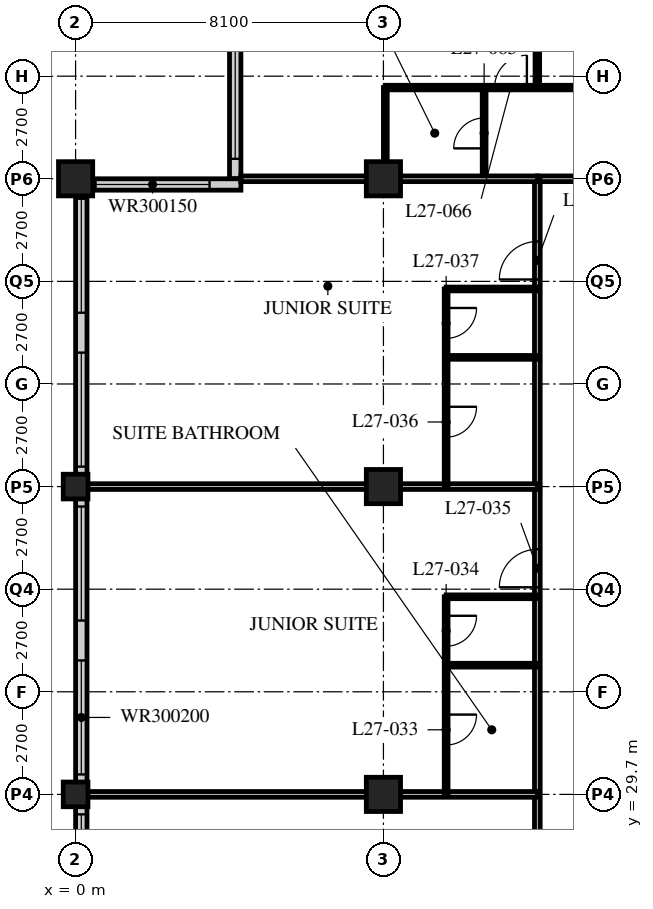
"""IFC4 building model, lengths in metres.
Left out: names, types, materials, properties, quantities, classifications, styles, units other than length and angle.
Written with IfcOpenShell. Run it as: python <this file> out.ifc"""

import sys

from ifc_helpers import new_model, si_unit, direction, frame, frame_2d, origin, origin_2d, place, context, subcontext, project, spatial, rectangle, hollow_rectangle, extrude, element, fill, save


model = new_model("IFC4")
c1 = context("Model", 3, precision=1e-05, world=origin(), true_north=direction((0.0, 1.0)))
c2 = subcontext(c1, "Body", "Model", "MODEL_VIEW")
j1 = project(units=[si_unit("LENGTHUNIT", "METRE"), si_unit("PLANEANGLEUNIT", "RADIAN")], contexts=[c1])
p1 = place(None, origin())
s1 = spatial("IfcSite", under=j1, at=p1, CompositionType="ELEMENT")
p2 = place(p1, origin())
s2 = spatial("IfcBuilding", under=s1, at=p2, CompositionType="ELEMENT")
p3 = place(p2, frame((0.0, 0.0, 110.2)))
s3 = spatial("IfcBuildingStorey", under=s2, at=p3, CompositionType="ELEMENT", Elevation=110.2)
for number, where, z_axis, x_axis in (
    (1, (0.0, 29.7, 0.0), (0.0, 0.0, 1.0), (1.0, 0.0, 0.0)),
    (2, (0.0, 37.8, 0.0), (0.0, 0.0, 1.0), (1.0, 0.0, 0.0)),
):
    element("IfcColumn", number, at=place(p3, frame(where, z_axis=z_axis, x_axis=x_axis)), inside=s3, PredefinedType="COLUMN", context=c2, shape_type="SweptSolid", body=[
        extrude(hollow_rectangle(XDim=0.65, YDim=0.65, WallThickness=0.055, at=origin_2d()), origin(), (0.0, 0.0, 1.0), 3.4),
    ])
for number, where, z_axis, x_axis in (
    (3, (0.0, 45.9, 0.0), (0.0, 0.0, 1.0), (1.0, 0.0, 0.0)),
    (4, (8.1, 29.7, 0.0), (0.0, 0.0, 1.0), (1.0, 0.0, 0.0)),
    (5, (8.1, 37.8, 0.0), (0.0, 0.0, 1.0), (1.0, 0.0, 0.0)),
    (6, (8.1, 45.9, 0.0), (0.0, 0.0, 1.0), (1.0, 0.0, 0.0)),
):
    element("IfcColumn", number, at=place(p3, frame(where, z_axis=z_axis, x_axis=x_axis)), inside=s3, PredefinedType="COLUMN", context=c2, shape_type="SweptSolid", body=[
        extrude(hollow_rectangle(XDim=0.9, YDim=0.9, WallThickness=0.09, at=origin_2d()), origin(), (0.0, 0.0, 1.0), 3.4),
    ])
p4 = place(p3, frame((4.2, 49.65, 0.0), z_axis=(0.0, 0.0, 1.0), x_axis=(0.0, -1.0, 0.0)))
e7 = element("IfcWall", 7, at=p4, inside=s3, PredefinedType="SOLIDWALL", context=c2, shape_type="SweptSolid", body=[
    extrude(rectangle(XDim=3.75, YDim=0.3, at=frame_2d((1.875, 0.0))), origin(), (0.0, 0.0, 1.0), 3.19),
])
p5 = place(p4, frame((0.225, 0.0, 0.9)))
e8 = element("IfcOpeningElement", 8, at=p5, cuts=e7, PredefinedType="OPENING", context=c2, shape_type="SweptSolid", body=[
    extrude(rectangle(XDim=3.0, YDim=1.5, at=frame_2d((1.5, 0.75))), frame((0.0, 0.16, 0.0), z_axis=(0.0, -1.0, 0.0), x_axis=(1.0, 0.0, 0.0)), (0.0, 0.0, 1.0), 0.32),
])
p6 = place(p3, frame((4.35, 45.75, 0.0), z_axis=(0.0, 0.0, 1.0), x_axis=(-1.0, 0.0, 0.0)))
e9 = element("IfcWall", 9, at=p6, inside=s3, PredefinedType="SOLIDWALL", context=c2, shape_type="SweptSolid", body=[
    extrude(rectangle(XDim=4.35, YDim=0.3, at=frame_2d((2.175, 0.0))), origin(), (0.0, 0.0, 1.0), 3.19),
])
p7 = place(p6, frame((0.825, 0.0, 0.9)))
e10 = element("IfcOpeningElement", 10, at=p7, cuts=e9, PredefinedType="OPENING", context=c2, shape_type="SweptSolid", body=[
    extrude(rectangle(XDim=3.0, YDim=1.5, at=frame_2d((1.5, 0.75))), frame((0.0, 0.16, 0.0), z_axis=(0.0, -1.0, 0.0), x_axis=(1.0, 0.0, 0.0)), (0.0, 0.0, 1.0), 0.32),
])
p8 = place(p3, frame((0.15, 45.6, 0.0), z_axis=(0.0, 0.0, 1.0), x_axis=(0.0, -1.0, 0.0)))
e11 = element("IfcWall", 11, at=p8, inside=s3, PredefinedType="SOLIDWALL", context=c2, shape_type="SweptSolid", body=[
    extrude(rectangle(XDim=32.1, YDim=0.3, at=frame_2d((16.05, 0.0))), origin(), (0.0, 0.0, 1.0), 3.19),
])
p9 = place(p8, frame((0.225, 0.0, 0.9)))
e12 = element("IfcOpeningElement", 12, at=p9, cuts=e11, PredefinedType="OPENING", context=c2, shape_type="SweptSolid", body=[
    extrude(rectangle(XDim=3.0, YDim=2.0, at=frame_2d((1.5, 1.0))), frame((0.0, 0.16, 0.0), z_axis=(0.0, -1.0, 0.0), x_axis=(1.0, 0.0, 0.0)), (0.0, 0.0, 1.0), 0.32),
])
p10 = place(p8, frame((4.275, 0.0, 0.9)))
e13 = element("IfcOpeningElement", 13, at=p10, cuts=e11, PredefinedType="OPENING", context=c2, shape_type="SweptSolid", body=[
    extrude(rectangle(XDim=3.0, YDim=2.0, at=frame_2d((1.5, 1.0))), frame((0.0, 0.16, 0.0), z_axis=(0.0, -1.0, 0.0), x_axis=(1.0, 0.0, 0.0)), (0.0, 0.0, 1.0), 0.32),
])
p11 = place(p8, frame((8.325, 0.0, 0.9)))
e14 = element("IfcOpeningElement", 14, at=p11, cuts=e11, PredefinedType="OPENING", context=c2, shape_type="SweptSolid", body=[
    extrude(rectangle(XDim=3.0, YDim=2.0, at=frame_2d((1.5, 1.0))), frame((0.0, 0.16, 0.0), z_axis=(0.0, -1.0, 0.0), x_axis=(1.0, 0.0, 0.0)), (0.0, 0.0, 1.0), 0.32),
])
p12 = place(p8, frame((12.375, 0.0, 0.9)))
e15 = element("IfcOpeningElement", 15, at=p12, cuts=e11, PredefinedType="OPENING", context=c2, shape_type="SweptSolid", body=[
    extrude(rectangle(XDim=3.0, YDim=2.0, at=frame_2d((1.5, 1.0))), frame((0.0, 0.16, 0.0), z_axis=(0.0, -1.0, 0.0), x_axis=(1.0, 0.0, 0.0)), (0.0, 0.0, 1.0), 0.32),
])
p13 = place(p8, frame((16.425, 0.0, 0.9)))
e16 = element("IfcOpeningElement", 16, at=p13, cuts=e11, PredefinedType="OPENING", context=c2, shape_type="SweptSolid", body=[
    extrude(rectangle(XDim=3.0, YDim=2.0, at=frame_2d((1.5, 1.0))), frame((0.0, 0.16, 0.0), z_axis=(0.0, -1.0, 0.0), x_axis=(1.0, 0.0, 0.0)), (0.0, 0.0, 1.0), 0.32),
])
p14 = place(p8, frame((20.475, 0.0, 0.9)))
e17 = element("IfcOpeningElement", 17, at=p14, cuts=e11, PredefinedType="OPENING", context=c2, shape_type="SweptSolid", body=[
    extrude(rectangle(XDim=3.0, YDim=2.0, at=frame_2d((1.5, 1.0))), frame((0.0, 0.16, 0.0), z_axis=(0.0, -1.0, 0.0), x_axis=(1.0, 0.0, 0.0)), (0.0, 0.0, 1.0), 0.32),
])
p15 = place(p8, frame((24.525, 0.0, 0.9)))
e18 = element("IfcOpeningElement", 18, at=p15, cuts=e11, PredefinedType="OPENING", context=c2, shape_type="SweptSolid", body=[
    extrude(rectangle(XDim=3.0, YDim=2.0, at=frame_2d((1.5, 1.0))), frame((0.0, 0.16, 0.0), z_axis=(0.0, -1.0, 0.0), x_axis=(1.0, 0.0, 0.0)), (0.0, 0.0, 1.0), 0.32),
])
p16 = place(p8, frame((28.575, 0.0, 0.9)))
e19 = element("IfcOpeningElement", 19, at=p16, cuts=e11, PredefinedType="OPENING", context=c2, shape_type="SweptSolid", body=[
    extrude(rectangle(XDim=3.0, YDim=2.0, at=frame_2d((1.5, 1.0))), frame((0.0, 0.16, 0.0), z_axis=(0.0, -1.0, 0.0), x_axis=(1.0, 0.0, 0.0)), (0.0, 0.0, 1.0), 0.32),
])
p17 = place(p3, frame((12.15, 45.9, 0.0), z_axis=(0.0, 0.0, 1.0), x_axis=(1.0, 0.0, 0.0)))
e20 = element("IfcWall", 20, at=p17, inside=s3, PredefinedType="PARTITIONING", context=c2, shape_type="SweptSolid", body=[
    extrude(rectangle(XDim=32.4, YDim=0.15, at=frame_2d((16.2, 0.0))), origin(), (0.0, 0.0, 1.0), 2.578),
])
p18 = place(p17, frame((9.5, 0.0, 0.0)))
e21 = element("IfcOpeningElement", 21, at=p18, cuts=e20, PredefinedType="OPENING", context=c2, shape_type="SweptSolid", body=[
    extrude(rectangle(XDim=1.0, YDim=2.1, at=frame_2d((0.5, 1.05))), frame((0.0, 0.085, 0.0), z_axis=(0.0, -1.0, 0.0), x_axis=(1.0, 0.0, 0.0)), (0.0, 0.0, 1.0), 0.17),
])
p19 = place(p17, frame((17.6, 0.0, 0.0)))
e22 = element("IfcOpeningElement", 22, at=p19, cuts=e20, PredefinedType="OPENING", context=c2, shape_type="SweptSolid", body=[
    extrude(rectangle(XDim=1.0, YDim=2.1, at=frame_2d((0.5, 1.05))), frame((0.0, 0.085, 0.0), z_axis=(0.0, -1.0, 0.0), x_axis=(1.0, 0.0, 0.0)), (0.0, 0.0, 1.0), 0.17),
])
p20 = place(p17, frame((25.7, 0.0, 0.0)))
e23 = element("IfcOpeningElement", 23, at=p20, cuts=e20, PredefinedType="OPENING", context=c2, shape_type="SweptSolid", body=[
    extrude(rectangle(XDim=1.0, YDim=2.1, at=frame_2d((0.5, 1.05))), frame((0.0, 0.085, 0.0), z_axis=(0.0, -1.0, 0.0), x_axis=(1.0, 0.0, 0.0)), (0.0, 0.0, 1.0), 0.17),
])
p21 = place(p17, frame((29.875, 0.0, 0.0)))
e24 = element("IfcOpeningElement", 24, at=p21, cuts=e20, PredefinedType="OPENING", context=c2, shape_type="SweptSolid", body=[
    extrude(rectangle(XDim=1.0, YDim=2.1, at=frame_2d((0.5, 1.05))), frame((0.0, 0.085, 0.0), z_axis=(0.0, -1.0, 0.0), x_axis=(1.0, 0.0, 0.0)), (0.0, 0.0, 1.0), 0.17),
])
p22 = place(p17, frame((1.525, 0.0, 0.0)))
e25 = element("IfcOpeningElement", 25, at=p22, cuts=e20, PredefinedType="OPENING", context=c2, shape_type="SweptSolid", body=[
    extrude(rectangle(XDim=1.0, YDim=2.1, at=frame_2d((0.5, 1.05))), frame((0.0, 0.085, 0.0), z_axis=(0.0, -1.0, 0.0), x_axis=(1.0, 0.0, 0.0)), (0.0, 0.0, 1.0), 0.17),
])
p23 = place(p3, frame((12.15, 21.6, 0.0), z_axis=(0.0, 0.0, 1.0), x_axis=(0.0, 1.0, 0.0)))
e26 = element("IfcWall", 26, at=p23, inside=s3, PredefinedType="PARTITIONING", context=c2, shape_type="SweptSolid", body=[
    extrude(rectangle(XDim=24.3, YDim=0.15, at=frame_2d((12.15, 0.0))), origin(), (0.0, 0.0, 1.0), 3.19),
])
p24 = place(p23, frame((5.45, 0.0, 0.0)))
e27 = element("IfcOpeningElement", 27, at=p24, cuts=e26, PredefinedType="OPENING", context=c2, shape_type="SweptSolid", body=[
    extrude(rectangle(XDim=1.0, YDim=2.1, at=frame_2d((0.5, 1.05))), frame((0.0, 0.085, 0.0), z_axis=(0.0, -1.0, 0.0), x_axis=(1.0, 0.0, 0.0)), (0.0, 0.0, 1.0), 0.17),
])
p25 = place(p23, frame((13.55, 0.0, 0.0)))
e28 = element("IfcOpeningElement", 28, at=p25, cuts=e26, PredefinedType="OPENING", context=c2, shape_type="SweptSolid", body=[
    extrude(rectangle(XDim=1.0, YDim=2.1, at=frame_2d((0.5, 1.05))), frame((0.0, 0.085, 0.0), z_axis=(0.0, -1.0, 0.0), x_axis=(1.0, 0.0, 0.0)), (0.0, 0.0, 1.0), 0.17),
])
p26 = place(p23, frame((21.65, 0.0, 0.0)))
e29 = element("IfcOpeningElement", 29, at=p26, cuts=e26, PredefinedType="OPENING", context=c2, shape_type="SweptSolid", body=[
    extrude(rectangle(XDim=1.0, YDim=2.1, at=frame_2d((0.5, 1.05))), frame((0.0, 0.085, 0.0), z_axis=(0.0, -1.0, 0.0), x_axis=(1.0, 0.0, 0.0)), (0.0, 0.0, 1.0), 0.17),
])
p27 = place(p3, frame((12.15, 29.7, 0.0), z_axis=(0.0, 0.0, 1.0), x_axis=(-1.0, 0.0, 0.0)))
e30 = element("IfcWall", 30, at=p27, inside=s3, PredefinedType="PARTITIONING", context=c2, shape_type="SweptSolid", body=[
    extrude(rectangle(XDim=11.85, YDim=0.15, at=frame_2d((5.925, 0.0))), origin(), (0.0, 0.0, 1.0), 2.578),
])
p28 = place(p3, frame((9.75, 29.7, 0.0), z_axis=(0.0, 0.0, 1.0), x_axis=(0.0, 1.0, 0.0)))
e31 = element("IfcWall", 31, at=p28, inside=s3, PredefinedType="PARTITIONING", context=c2, shape_type="SweptSolid", body=[
    extrude(rectangle(XDim=5.2, YDim=0.1, at=frame_2d((2.6, 0.0))), origin(), (0.0, 0.0, 1.0), 3.19),
])
p29 = place(p28, frame((1.3, 0.0, 0.0)))
e32 = element("IfcOpeningElement", 32, at=p29, cuts=e31, PredefinedType="OPENING", context=c2, shape_type="SweptSolid", body=[
    extrude(rectangle(XDim=0.8, YDim=2.1, at=frame_2d((0.4, 1.05))), frame((0.0, 0.06, 0.0), z_axis=(0.0, -1.0, 0.0), x_axis=(1.0, 0.0, 0.0)), (0.0, 0.0, 1.0), 0.12),
])
p30 = place(p28, frame((3.9, 0.0, 0.0)))
e33 = element("IfcOpeningElement", 33, at=p30, cuts=e31, PredefinedType="OPENING", context=c2, shape_type="SweptSolid", body=[
    extrude(rectangle(XDim=0.8, YDim=2.1, at=frame_2d((0.4, 1.05))), frame((0.0, 0.06, 0.0), z_axis=(0.0, -1.0, 0.0), x_axis=(1.0, 0.0, 0.0)), (0.0, 0.0, 1.0), 0.12),
])
for number, where, z_axis, x_axis in (
    (34, (12.15, 33.1, 0.0), (0.0, 0.0, 1.0), (-1.0, 0.0, 0.0)),
    (35, (12.15, 34.9, 0.0), (0.0, 0.0, 1.0), (-1.0, 0.0, 0.0)),
):
    element("IfcWall", number, at=place(p3, frame(where, z_axis=z_axis, x_axis=x_axis)), inside=s3, PredefinedType="PARTITIONING", context=c2, shape_type="SweptSolid", body=[
        extrude(rectangle(XDim=2.4, YDim=0.1, at=frame_2d((1.2, 0.0))), origin(), (0.0, 0.0, 1.0), 3.19),
    ])
p31 = place(p3, frame((12.15, 37.8, 0.0), z_axis=(0.0, 0.0, 1.0), x_axis=(-1.0, 0.0, 0.0)))
e36 = element("IfcWall", 36, at=p31, inside=s3, PredefinedType="PARTITIONING", context=c2, shape_type="SweptSolid", body=[
    extrude(rectangle(XDim=11.85, YDim=0.15, at=frame_2d((5.925, 0.0))), origin(), (0.0, 0.0, 1.0), 2.578),
])
p32 = place(p3, frame((9.75, 37.8, 0.0), z_axis=(0.0, 0.0, 1.0), x_axis=(0.0, 1.0, 0.0)))
e37 = element("IfcWall", 37, at=p32, inside=s3, PredefinedType="PARTITIONING", context=c2, shape_type="SweptSolid", body=[
    extrude(rectangle(XDim=5.2, YDim=0.1, at=frame_2d((2.6, 0.0))), origin(), (0.0, 0.0, 1.0), 3.19),
])
p33 = place(p32, frame((1.3, 0.0, 0.0)))
e38 = element("IfcOpeningElement", 38, at=p33, cuts=e37, PredefinedType="OPENING", context=c2, shape_type="SweptSolid", body=[
    extrude(rectangle(XDim=0.8, YDim=2.1, at=frame_2d((0.4, 1.05))), frame((0.0, 0.06, 0.0), z_axis=(0.0, -1.0, 0.0), x_axis=(1.0, 0.0, 0.0)), (0.0, 0.0, 1.0), 0.12),
])
p34 = place(p32, frame((3.9, 0.0, 0.0)))
e39 = element("IfcOpeningElement", 39, at=p34, cuts=e37, PredefinedType="OPENING", context=c2, shape_type="SweptSolid", body=[
    extrude(rectangle(XDim=0.8, YDim=2.1, at=frame_2d((0.4, 1.05))), frame((0.0, 0.06, 0.0), z_axis=(0.0, -1.0, 0.0), x_axis=(1.0, 0.0, 0.0)), (0.0, 0.0, 1.0), 0.12),
])
for number, where, z_axis, x_axis in (
    (40, (12.15, 41.2, 0.0), (0.0, 0.0, 1.0), (-1.0, 0.0, 0.0)),
    (41, (12.15, 43.0, 0.0), (0.0, 0.0, 1.0), (-1.0, 0.0, 0.0)),
):
    element("IfcWall", number, at=place(p3, frame(where, z_axis=z_axis, x_axis=x_axis)), inside=s3, PredefinedType="PARTITIONING", context=c2, shape_type="SweptSolid", body=[
        extrude(rectangle(XDim=2.4, YDim=0.1, at=frame_2d((1.2, 0.0))), origin(), (0.0, 0.0, 1.0), 3.19),
    ])
p35 = place(p3, frame((10.75, 45.9, 0.0), z_axis=(0.0, 0.0, 1.0), x_axis=(0.0, 1.0, 0.0)))
e42 = element("IfcWall", 42, at=p35, inside=s3, PredefinedType="PARTITIONING", context=c2, shape_type="SweptSolid", body=[
    extrude(rectangle(XDim=2.4, YDim=0.1, at=frame_2d((1.2, 0.0))), origin(), (0.0, 0.0, 1.0), 3.19),
])
p36 = place(p35, frame((0.8, 0.0, 0.0)))
e43 = element("IfcOpeningElement", 43, at=p36, cuts=e42, PredefinedType="OPENING", context=c2, shape_type="SweptSolid", body=[
    extrude(rectangle(XDim=0.8, YDim=2.1, at=frame_2d((0.4, 1.05))), frame((0.0, 0.06, 0.0), z_axis=(0.0, -1.0, 0.0), x_axis=(1.0, 0.0, 0.0)), (0.0, 0.0, 1.0), 0.12),
])
p37 = place(p3, frame((8.15, 45.9, 0.0), z_axis=(0.0, 0.0, 1.0), x_axis=(0.0, 1.0, 0.0)))
e44 = element("IfcWall", 44, at=p37, inside=s3, PredefinedType="PARTITIONING", context=c2, shape_type="SweptSolid", body=[
    extrude(rectangle(XDim=2.4, YDim=0.1, at=frame_2d((1.2, 0.0))), origin(), (0.0, 0.0, 1.0), 2.578),
])
p38 = place(p3, frame((8.15, 48.3, 0.0), z_axis=(0.0, 0.0, 1.0), x_axis=(1.0, 0.0, 0.0)))
e45 = element("IfcWall", 45, at=p38, inside=s3, PredefinedType="PARTITIONING", context=c2, shape_type="SweptSolid", body=[
    extrude(rectangle(XDim=8.05, YDim=0.12, at=frame_2d((4.025, 0.0))), origin(), (0.0, 0.0, 1.0), 3.19),
])
p39 = place(p38, frame((6.725, 0.0, 0.0)))
e46 = element("IfcOpeningElement", 46, at=p39, cuts=e45, PredefinedType="OPENING", context=c2, shape_type="SweptSolid", body=[
    extrude(rectangle(XDim=0.85, YDim=2.1, at=frame_2d((0.425, 1.05))), frame((0.0, 0.07, 0.0), z_axis=(0.0, -1.0, 0.0), x_axis=(1.0, 0.0, 0.0)), (0.0, 0.0, 1.0), 0.14),
])
p40 = place(p38, frame((2.875, 0.0, 0.0)))
e47 = element("IfcOpeningElement", 47, at=p40, cuts=e45, PredefinedType="OPENING", context=c2, shape_type="SweptSolid", body=[
    extrude(rectangle(XDim=0.85, YDim=2.1, at=frame_2d((0.425, 1.05))), frame((0.0, 0.07, 0.0), z_axis=(0.0, -1.0, 0.0), x_axis=(1.0, 0.0, 0.0)), (0.0, 0.0, 1.0), 0.14),
])
p41 = place(p3, frame((12.15, 48.3, 0.0), z_axis=(0.0, 0.0, 1.0), x_axis=(0.0, 1.0, 0.0)))
e48 = element("IfcWall", 48, at=p41, inside=s3, PredefinedType="PARTITIONING", context=c2, shape_type="SweptSolid", body=[
    extrude(rectangle(XDim=5.4, YDim=0.12, at=frame_2d((2.7, 0.0))), origin(), (0.0, 0.0, 1.0), 3.19),
])
p42 = place(p3, frame((4.35, 45.9, 0.0), z_axis=(0.0, 0.0, 1.0), x_axis=(1.0, 0.0, 0.0)))
e49 = element("IfcWall", 49, at=p42, inside=s3, PredefinedType="PARTITIONING", context=c2, shape_type="SweptSolid", body=[
    extrude(rectangle(XDim=7.8, YDim=0.15, at=frame_2d((3.9, 0.0))), origin(), (0.0, 0.0, 1.0), 2.578),
])
p43 = place(p5, origin())
e50 = element("IfcWindow", 50, at=p43, inside=s3, PartitioningType="SINGLE_PANEL", PredefinedType="WINDOW", context=c2, shape_type="SweptSolid", body=[
    extrude(rectangle(XDim=3.0, YDim=1.5, at=frame_2d((1.5, 0.75))), frame((0.0, 0.03, 0.0), z_axis=(0.0, -1.0, 0.0), x_axis=(1.0, 0.0, 0.0)), (0.0, 0.0, 1.0), 0.06),
])
fill(e8, e50)
p44 = place(p7, origin())
e51 = element("IfcWindow", 51, at=p44, inside=s3, PartitioningType="SINGLE_PANEL", PredefinedType="WINDOW", context=c2, shape_type="SweptSolid", body=[
    extrude(rectangle(XDim=3.0, YDim=1.5, at=frame_2d((1.5, 0.75))), frame((0.0, 0.03, 0.0), z_axis=(0.0, -1.0, 0.0), x_axis=(1.0, 0.0, 0.0)), (0.0, 0.0, 1.0), 0.06),
])
fill(e10, e51)
p45 = place(p9, origin())
e52 = element("IfcWindow", 52, at=p45, inside=s3, PartitioningType="SINGLE_PANEL", PredefinedType="WINDOW", context=c2, shape_type="SweptSolid", body=[
    extrude(rectangle(XDim=3.0, YDim=2.0, at=frame_2d((1.5, 1.0))), frame((0.0, 0.03, 0.0), z_axis=(0.0, -1.0, 0.0), x_axis=(1.0, 0.0, 0.0)), (0.0, 0.0, 1.0), 0.06),
])
fill(e12, e52)
p46 = place(p10, origin())
e53 = element("IfcWindow", 53, at=p46, inside=s3, PartitioningType="SINGLE_PANEL", PredefinedType="WINDOW", context=c2, shape_type="SweptSolid", body=[
    extrude(rectangle(XDim=3.0, YDim=2.0, at=frame_2d((1.5, 1.0))), frame((0.0, 0.03, 0.0), z_axis=(0.0, -1.0, 0.0), x_axis=(1.0, 0.0, 0.0)), (0.0, 0.0, 1.0), 0.06),
])
fill(e13, e53)
p47 = place(p11, origin())
e54 = element("IfcWindow", 54, at=p47, inside=s3, PartitioningType="SINGLE_PANEL", PredefinedType="WINDOW", context=c2, shape_type="SweptSolid", body=[
    extrude(rectangle(XDim=3.0, YDim=2.0, at=frame_2d((1.5, 1.0))), frame((0.0, 0.03, 0.0), z_axis=(0.0, -1.0, 0.0), x_axis=(1.0, 0.0, 0.0)), (0.0, 0.0, 1.0), 0.06),
])
fill(e14, e54)
p48 = place(p12, origin())
e55 = element("IfcWindow", 55, at=p48, inside=s3, PartitioningType="SINGLE_PANEL", PredefinedType="WINDOW", context=c2, shape_type="SweptSolid", body=[
    extrude(rectangle(XDim=3.0, YDim=2.0, at=frame_2d((1.5, 1.0))), frame((0.0, 0.03, 0.0), z_axis=(0.0, -1.0, 0.0), x_axis=(1.0, 0.0, 0.0)), (0.0, 0.0, 1.0), 0.06),
])
fill(e15, e55)
p49 = place(p13, origin())
e56 = element("IfcWindow", 56, at=p49, inside=s3, PartitioningType="SINGLE_PANEL", PredefinedType="WINDOW", context=c2, shape_type="SweptSolid", body=[
    extrude(rectangle(XDim=3.0, YDim=2.0, at=frame_2d((1.5, 1.0))), frame((0.0, 0.03, 0.0), z_axis=(0.0, -1.0, 0.0), x_axis=(1.0, 0.0, 0.0)), (0.0, 0.0, 1.0), 0.06),
])
fill(e16, e56)
p50 = place(p29, origin())
e57 = element("IfcDoor", 57, at=p50, inside=s3, OperationType="SINGLE_SWING_LEFT", PredefinedType="DOOR", context=c2, shape_type="SweptSolid", body=[
    extrude(rectangle(XDim=0.8, YDim=2.1, at=frame_2d((0.4, 1.05))), frame((0.0, 0.025, 0.0), z_axis=(0.0, -1.0, 0.0), x_axis=(1.0, 0.0, 0.0)), (0.0, 0.0, 1.0), 0.05),
])
fill(e32, e57)
p51 = place(p30, origin())
e58 = element("IfcDoor", 58, at=p51, inside=s3, OperationType="SINGLE_SWING_LEFT", PredefinedType="DOOR", context=c2, shape_type="SweptSolid", body=[
    extrude(rectangle(XDim=0.8, YDim=2.1, at=frame_2d((0.4, 1.05))), frame((0.0, 0.025, 0.0), z_axis=(0.0, -1.0, 0.0), x_axis=(1.0, 0.0, 0.0)), (0.0, 0.0, 1.0), 0.05),
])
fill(e33, e58)
p52 = place(p25, origin())
e59 = element("IfcDoor", 59, at=p52, inside=s3, OperationType="SINGLE_SWING_LEFT", PredefinedType="DOOR", context=c2, shape_type="SweptSolid", body=[
    extrude(rectangle(XDim=1.0, YDim=2.1, at=frame_2d((0.5, 1.05))), frame((0.0, 0.025, 0.0), z_axis=(0.0, -1.0, 0.0), x_axis=(1.0, 0.0, 0.0)), (0.0, 0.0, 1.0), 0.05),
])
fill(e28, e59)
p53 = place(p33, origin())
e60 = element("IfcDoor", 60, at=p53, inside=s3, OperationType="SINGLE_SWING_LEFT", PredefinedType="DOOR", context=c2, shape_type="SweptSolid", body=[
    extrude(rectangle(XDim=0.8, YDim=2.1, at=frame_2d((0.4, 1.05))), frame((0.0, 0.025, 0.0), z_axis=(0.0, -1.0, 0.0), x_axis=(1.0, 0.0, 0.0)), (0.0, 0.0, 1.0), 0.05),
])
fill(e38, e60)
p54 = place(p34, origin())
e61 = element("IfcDoor", 61, at=p54, inside=s3, OperationType="SINGLE_SWING_LEFT", PredefinedType="DOOR", context=c2, shape_type="SweptSolid", body=[
    extrude(rectangle(XDim=0.8, YDim=2.1, at=frame_2d((0.4, 1.05))), frame((0.0, 0.025, 0.0), z_axis=(0.0, -1.0, 0.0), x_axis=(1.0, 0.0, 0.0)), (0.0, 0.0, 1.0), 0.05),
])
fill(e39, e61)
p55 = place(p26, origin())
e62 = element("IfcDoor", 62, at=p55, inside=s3, OperationType="SINGLE_SWING_LEFT", PredefinedType="DOOR", context=c2, shape_type="SweptSolid", body=[
    extrude(rectangle(XDim=1.0, YDim=2.1, at=frame_2d((0.5, 1.05))), frame((0.0, 0.025, 0.0), z_axis=(0.0, -1.0, 0.0), x_axis=(1.0, 0.0, 0.0)), (0.0, 0.0, 1.0), 0.05),
])
fill(e29, e62)
p56 = place(p36, origin())
e63 = element("IfcDoor", 63, at=p56, inside=s3, OperationType="SINGLE_SWING_LEFT", PredefinedType="DOOR", context=c2, shape_type="SweptSolid", body=[
    extrude(rectangle(XDim=0.8, YDim=2.1, at=frame_2d((0.4, 1.05))), frame((0.0, 0.025, 0.0), z_axis=(0.0, -1.0, 0.0), x_axis=(1.0, 0.0, 0.0)), (0.0, 0.0, 1.0), 0.05),
])
fill(e43, e63)
p57 = place(p40, origin())
e64 = element("IfcDoor", 64, at=p57, inside=s3, OperationType="SINGLE_SWING_RIGHT", PredefinedType="DOOR", context=c2, shape_type="SweptSolid", body=[
    extrude(rectangle(XDim=0.85, YDim=2.1, at=frame_2d((0.425, 1.05))), frame((0.0, 0.025, 0.0), z_axis=(0.0, -1.0, 0.0), x_axis=(1.0, 0.0, 0.0)), (0.0, 0.0, 1.0), 0.05),
])
fill(e47, e64)
save(model, sys.argv[1])
